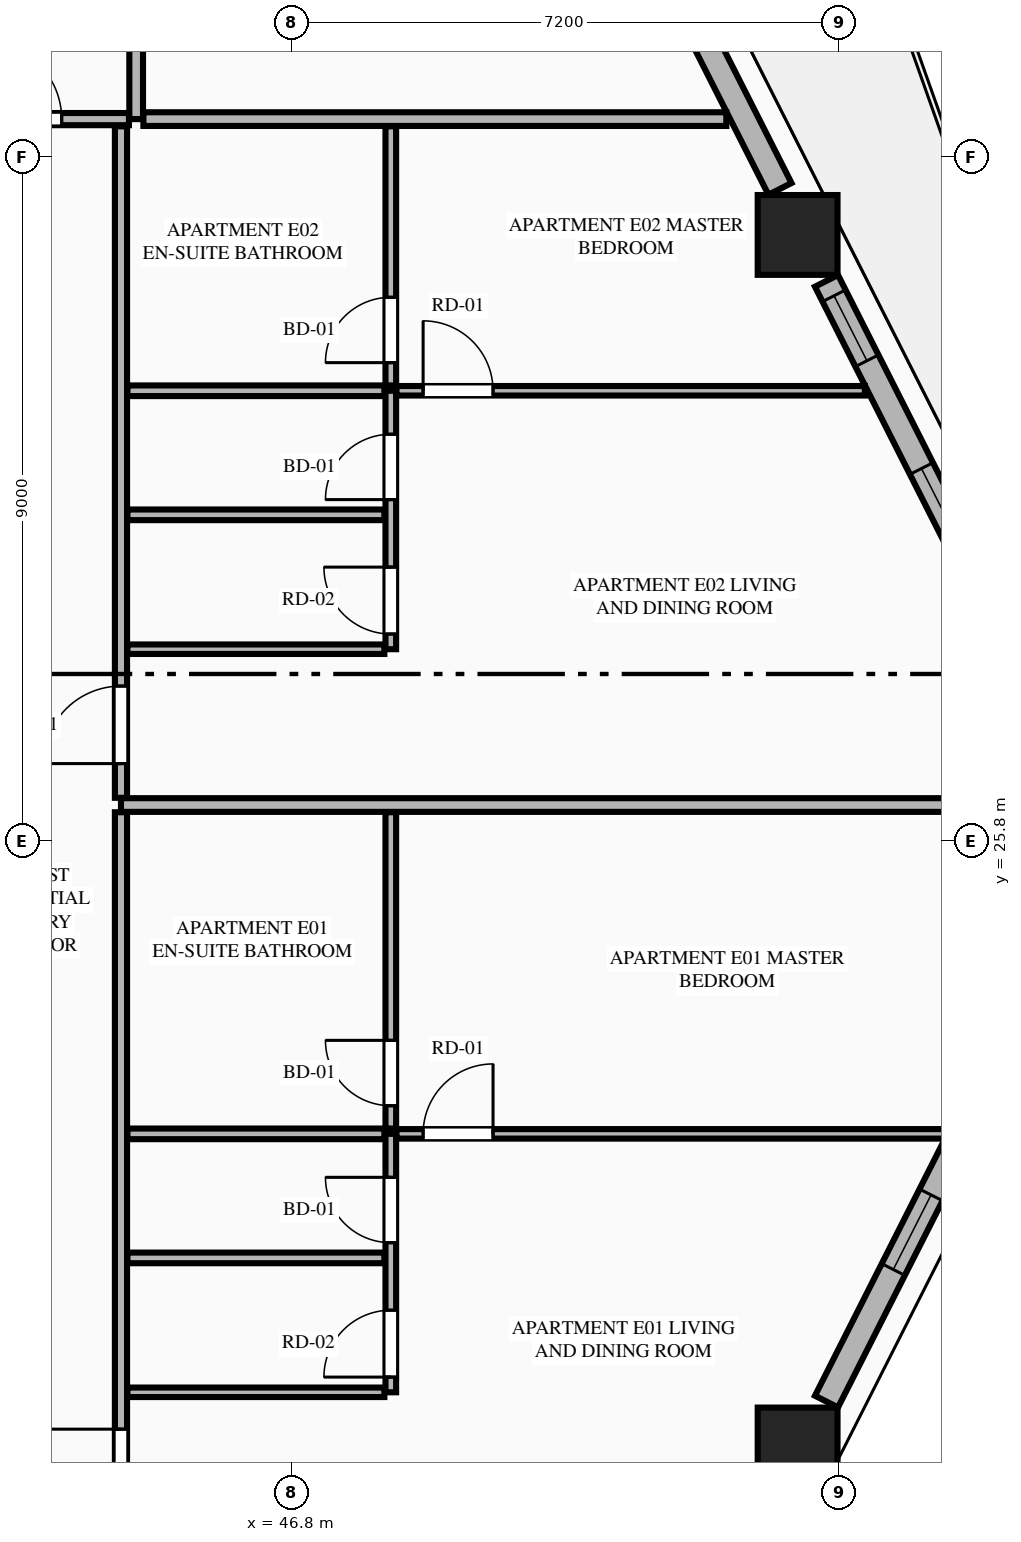
"""IFC4 building model, lengths in metres.
Left out: names, types, materials, properties, quantities, classifications, styles, units other than length and angle.
Written with IfcOpenShell. Run it as: python <this file> out.ifc"""

import sys

from ifc_helpers import new_model, si_unit, direction, frame, frame_2d, origin, origin_2d, place, context, subcontext, project, spatial, rectangle, extrude, element, fill, save


model = new_model("IFC4")
c1 = context("Model", 3, precision=1e-05, world=origin(), true_north=direction((0.0, 1.0)))
c2 = subcontext(c1, "Body", "Model", "MODEL_VIEW")
j1 = project(units=[si_unit("LENGTHUNIT", "METRE"), si_unit("PLANEANGLEUNIT", "RADIAN")], contexts=[c1])
p1 = place(None, origin())
s1 = spatial("IfcSite", under=j1, at=p1, CompositionType="ELEMENT")
p2 = place(p1, origin())
s2 = spatial("IfcBuilding", under=s1, at=p2, CompositionType="ELEMENT")
p3 = place(p2, frame((0.0, 0.0, 109.05)))
s3 = spatial("IfcBuildingStorey", under=s2, at=p3, CompositionType="ELEMENT", Elevation=109.05)
for number, where, z_axis, x_axis in (
    (1, (53.452, 17.824, 0.0), (0.0, 0.0, 1.0), (1.0, 0.0, 0.0)),
    (2, (53.452, 33.776, 0.0), (0.0, 0.0, 1.0), (1.0, 0.0, 0.0)),
):
    element("IfcColumn", number, at=place(p3, frame(where, z_axis=z_axis, x_axis=x_axis)), inside=s3, PredefinedType="COLUMN", context=c2, shape_type="SweptSolid", body=[
        extrude(rectangle(XDim=1.05, YDim=1.05, at=origin_2d()), origin(), (0.0, 0.0, 1.0), 3.55),
    ])
p4 = place(p3, frame((53.832, 18.428, 0.0), z_axis=(0.0, 0.0, 1.0), x_axis=(0.451431617681, 0.892305718102, 0.0)))
e3 = element("IfcWall", 3, at=p4, inside=s3, PredefinedType="STANDARD", context=c2, shape_type="SweptSolid", body=[
    extrude(rectangle(XDim=4.995, YDim=0.34, at=frame_2d((2.498, 0.0))), origin(), (0.0, 0.0, 1.0), 2.797),
])
p5 = place(p4, frame((1.947, 0.0, 0.75)))
e4 = element("IfcOpeningElement", 4, at=p5, cuts=e3, PredefinedType="OPENING", context=c2, shape_type="SweptSolid", body=[
    extrude(rectangle(XDim=1.1, YDim=1.897, at=frame_2d((0.55, 0.948))), frame((0.0, 0.18, 0.0), z_axis=(0.0, -1.0, 0.0), x_axis=(1.0, 0.0, 0.0)), (0.0, 0.0, 1.0), 0.36),
])
p6 = place(p3, frame((56.087, 28.715, 0.0), z_axis=(0.0, 0.0, 1.0), x_axis=(-0.451431617681, 0.892305718102, 0.0)))
e5 = element("IfcWall", 5, at=p6, inside=s3, PredefinedType="STANDARD", context=c2, shape_type="SweptSolid", body=[
    extrude(rectangle(XDim=4.995, YDim=0.34, at=frame_2d((2.498, 0.0))), origin(), (0.0, 0.0, 1.0), 2.797),
])
p7 = place(p6, frame((1.128, 0.0, 0.75)))
e6 = element("IfcOpeningElement", 6, at=p7, cuts=e5, PredefinedType="OPENING", context=c2, shape_type="SweptSolid", body=[
    extrude(rectangle(XDim=1.1, YDim=1.897, at=frame_2d((0.55, 0.948))), frame((0.0, 0.18, 0.0), z_axis=(0.0, -1.0, 0.0), x_axis=(1.0, 0.0, 0.0)), (0.0, 0.0, 1.0), 0.36),
])
p8 = place(p6, frame((3.817, 0.0, 0.75)))
e7 = element("IfcOpeningElement", 7, at=p8, cuts=e5, PredefinedType="OPENING", context=c2, shape_type="SweptSolid", body=[
    extrude(rectangle(XDim=0.958, YDim=1.897, at=frame_2d((0.479, 0.948))), frame((0.0, 0.18, 0.0), z_axis=(0.0, -1.0, 0.0), x_axis=(1.0, 0.0, 0.0)), (0.0, 0.0, 1.0), 0.36),
])
p9 = place(p3, frame((53.22, 34.382, 0.0), z_axis=(0.0, 0.0, 1.0), x_axis=(-0.451567731634, 0.892236842855, 0.0)))
e8 = element("IfcWall", 8, at=p9, inside=s3, PredefinedType="STANDARD", context=c2, shape_type="SweptSolid", body=[
    extrude(rectangle(XDim=5.219, YDim=0.34, at=frame_2d((2.61, 0.0))), origin(), (0.0, 0.0, 1.0), 2.797),
])
p10 = place(p9, frame((2.699, 0.0, 0.0)))
e9 = element("IfcOpeningElement", 9, at=p10, cuts=e8, PredefinedType="OPENING", context=c2, shape_type="SweptSolid", body=[
    extrude(rectangle(XDim=1.1, YDim=2.25, at=frame_2d((0.55, 1.125))), frame((0.0, 0.18, 0.0), z_axis=(0.0, -1.0, 0.0), x_axis=(1.0, 0.0, 0.0)), (0.0, 0.0, 1.0), 0.36),
])
p11 = place(p3, frame((44.75, 35.3, 0.0), z_axis=(0.0, 0.0, 1.0), x_axis=(0.0, 1.0, 0.0)))
e10 = element("IfcWall", 10, at=p11, inside=s3, PredefinedType="PARTITIONING", context=c2, shape_type="SweptSolid", body=[
    extrude(rectangle(XDim=12.195, YDim=0.18, at=frame_2d((6.098, 0.0))), origin(), (0.0, 0.0, 1.0), 3.34),
])
p12 = place(p3, frame((28.663, 35.3, 0.0), z_axis=(0.0, 0.0, 1.0), x_axis=(1.0, 0.0, 0.0)))
e11 = element("IfcWall", 11, at=p12, inside=s3, PredefinedType="PARTITIONING", context=c2, shape_type="SweptSolid", body=[
    extrude(rectangle(XDim=15.992, YDim=0.16, at=frame_2d((7.996, 0.0))), origin(), (0.0, 0.0, 1.0), 3.34),
])
p13 = place(p12, frame((14.087, 0.0, 0.0)))
e12 = element("IfcOpeningElement", 12, at=p13, cuts=e11, PredefinedType="OPENING", context=c2, shape_type="SweptSolid", body=[
    extrude(rectangle(XDim=1.02, YDim=2.25, at=frame_2d((0.51, 1.125))), frame((0.0, 0.09, 0.0), z_axis=(0.0, -1.0, 0.0), x_axis=(1.0, 0.0, 0.0)), (0.0, 0.0, 1.0), 0.18),
])
p14 = place(p3, frame((44.845, 35.3, 0.0), z_axis=(0.0, 0.0, 1.0), x_axis=(1.0, 0.0, 0.0)))
e13 = element("IfcWall", 13, at=p14, inside=s3, PredefinedType="PARTITIONING", context=c2, shape_type="SweptSolid", body=[
    extrude(rectangle(XDim=7.669, YDim=0.18, at=frame_2d((3.834, 0.0))), origin(), (0.0, 0.0, 1.0), 3.34),
])
p15 = place(p3, frame((44.55, 16.595, 0.0), z_axis=(0.0, 0.0, 1.0), x_axis=(0.0, 1.0, 0.0)))
e14 = element("IfcWall", 14, at=p15, inside=s3, PredefinedType="PARTITIONING", context=c2, shape_type="SweptSolid", body=[
    extrude(rectangle(XDim=9.586, YDim=0.16, at=frame_2d((4.793, 0.0))), origin(), (0.0, 0.0, 1.0), 3.34),
])
p16 = place(p15, frame((0.45, 0.0, 0.0)))
e15 = element("IfcOpeningElement", 15, at=p16, cuts=e14, PredefinedType="OPENING", context=c2, shape_type="SweptSolid", body=[
    extrude(rectangle(XDim=1.02, YDim=2.25, at=frame_2d((0.51, 1.125))), frame((0.0, 0.09, 0.0), z_axis=(0.0, -1.0, 0.0), x_axis=(1.0, 0.0, 0.0)), (0.0, 0.0, 1.0), 0.18),
])
p17 = place(p3, frame((44.635, 18.55, 0.0), z_axis=(0.0, 0.0, 1.0), x_axis=(1.0, 0.0, 0.0)))
e16 = element("IfcWall", 16, at=p17, inside=s3, PredefinedType="PARTITIONING", context=c2, shape_type="SweptSolid", body=[
    extrude(rectangle(XDim=3.38, YDim=0.125, at=frame_2d((1.69, 0.0))), origin(), (0.0, 0.0, 1.0), 2.722),
])
p18 = place(p3, frame((48.1, 18.55, 0.0), z_axis=(0.0, 0.0, 1.0), x_axis=(0.0, 1.0, 0.0)))
e17 = element("IfcWall", 17, at=p18, inside=s3, PredefinedType="PLUMBINGWALL", context=c2, shape_type="SweptSolid", body=[
    extrude(rectangle(XDim=3.4, YDim=0.14, at=frame_2d((1.7, 0.0))), origin(), (0.0, 0.0, 1.0), 3.34),
])
p19 = place(p18, frame((0.2, 0.0, 0.0)))
e18 = element("IfcOpeningElement", 18, at=p19, cuts=e17, PredefinedType="OPENING", context=c2, shape_type="SweptSolid", body=[
    extrude(rectangle(XDim=0.88, YDim=2.15, at=frame_2d((0.44, 1.075))), frame((0.0, 0.08, 0.0), z_axis=(0.0, -1.0, 0.0), x_axis=(1.0, 0.0, 0.0)), (0.0, 0.0, 1.0), 0.16),
])
p20 = place(p18, frame((1.968, 0.0, 0.0)))
e19 = element("IfcOpeningElement", 19, at=p20, cuts=e17, PredefinedType="OPENING", context=c2, shape_type="SweptSolid", body=[
    extrude(rectangle(XDim=0.86, YDim=2.1, at=frame_2d((0.43, 1.05))), frame((0.0, 0.08, 0.0), z_axis=(0.0, -1.0, 0.0), x_axis=(1.0, 0.0, 0.0)), (0.0, 0.0, 1.0), 0.16),
])
p21 = place(p3, frame((48.1, 22.02, 0.0), z_axis=(0.0, 0.0, 1.0), x_axis=(0.0, 1.0, 0.0)))
e20 = element("IfcWall", 20, at=p21, inside=s3, PredefinedType="PLUMBINGWALL", context=c2, shape_type="SweptSolid", body=[
    extrude(rectangle(XDim=4.161, YDim=0.14, at=frame_2d((2.081, 0.0))), origin(), (0.0, 0.0, 1.0), 3.34),
])
p22 = place(p21, frame((0.3, 0.0, 0.0)))
e21 = element("IfcOpeningElement", 21, at=p22, cuts=e20, PredefinedType="OPENING", context=c2, shape_type="SweptSolid", body=[
    extrude(rectangle(XDim=0.86, YDim=2.1, at=frame_2d((0.43, 1.05))), frame((0.0, 0.08, 0.0), z_axis=(0.0, -1.0, 0.0), x_axis=(1.0, 0.0, 0.0)), (0.0, 0.0, 1.0), 0.16),
])
p23 = place(p3, frame((44.635, 21.95, 0.0), z_axis=(0.0, 0.0, 1.0), x_axis=(1.0, 0.0, 0.0)))
e22 = element("IfcWall", 22, at=p23, inside=s3, PredefinedType="PLUMBINGWALL", context=c2, shape_type="SweptSolid", body=[
    extrude(rectangle(XDim=3.38, YDim=0.14, at=frame_2d((1.69, 0.0))), origin(), (0.0, 0.0, 1.0), 3.34),
])
p24 = place(p3, frame((48.175, 21.95, 0.0), z_axis=(0.0, 0.0, 1.0), x_axis=(1.0, 0.0, 0.0)))
e23 = element("IfcWall", 23, at=p24, inside=s3, PredefinedType="PARTITIONING", context=c2, shape_type="SweptSolid", body=[
    extrude(rectangle(XDim=7.213, YDim=0.125, at=frame_2d((3.606, 0.0))), origin(), (0.0, 0.0, 1.0), 3.34),
])
p25 = place(p24, frame((0.35, 0.0, 0.0)))
e24 = element("IfcOpeningElement", 24, at=p25, cuts=e23, PredefinedType="OPENING", context=c2, shape_type="SweptSolid", body=[
    extrude(rectangle(XDim=0.92, YDim=2.15, at=frame_2d((0.46, 1.075))), frame((0.0, 0.073, 0.0), z_axis=(0.0, -1.0, 0.0), x_axis=(1.0, 0.0, 0.0)), (0.0, 0.0, 1.0), 0.145),
])
p26 = place(p3, frame((44.635, 20.318, 0.0), z_axis=(0.0, 0.0, 1.0), x_axis=(1.0, 0.0, 0.0)))
e25 = element("IfcWall", 25, at=p26, inside=s3, PredefinedType="PLUMBINGWALL", context=c2, shape_type="SweptSolid", body=[
    extrude(rectangle(XDim=3.38, YDim=0.14, at=frame_2d((1.69, 0.0))), origin(), (0.0, 0.0, 1.0), 3.34),
])
p27 = place(p3, frame((44.55, 26.276, 0.0), z_axis=(0.0, 0.0, 1.0), x_axis=(1.0, 0.0, 0.0)))
e26 = element("IfcWall", 26, at=p27, inside=s3, PredefinedType="PARTITIONING", context=c2, shape_type="SweptSolid", body=[
    extrude(rectangle(XDim=12.308, YDim=0.18, at=frame_2d((6.154, 0.0))), origin(), (0.0, 0.0, 1.0), 3.34),
])
p28 = place(p3, frame((44.55, 26.371, 0.0), z_axis=(0.0, 0.0, 1.0), x_axis=(0.0, 1.0, 0.0)))
e27 = element("IfcWall", 27, at=p28, inside=s3, PredefinedType="PARTITIONING", context=c2, shape_type="SweptSolid", body=[
    extrude(rectangle(XDim=8.834, YDim=0.16, at=frame_2d((4.417, 0.0))), origin(), (0.0, 0.0, 1.0), 3.34),
])
p29 = place(p28, frame((0.45, 0.0, 0.0)))
e28 = element("IfcOpeningElement", 28, at=p29, cuts=e27, PredefinedType="OPENING", context=c2, shape_type="SweptSolid", body=[
    extrude(rectangle(XDim=1.02, YDim=2.25, at=frame_2d((0.51, 1.125))), frame((0.0, 0.09, 0.0), z_axis=(0.0, -1.0, 0.0), x_axis=(1.0, 0.0, 0.0)), (0.0, 0.0, 1.0), 0.18),
])
p30 = place(p3, frame((44.635, 28.326, 0.0), z_axis=(0.0, 0.0, 1.0), x_axis=(1.0, 0.0, 0.0)))
e29 = element("IfcWall", 29, at=p30, inside=s3, PredefinedType="PARTITIONING", context=c2, shape_type="SweptSolid", body=[
    extrude(rectangle(XDim=3.38, YDim=0.125, at=frame_2d((1.69, 0.0))), origin(), (0.0, 0.0, 1.0), 3.34),
])
p31 = place(p3, frame((48.1, 28.326, 0.0), z_axis=(0.0, 0.0, 1.0), x_axis=(0.0, 1.0, 0.0)))
e30 = element("IfcWall", 30, at=p31, inside=s3, PredefinedType="PLUMBINGWALL", context=c2, shape_type="SweptSolid", body=[
    extrude(rectangle(XDim=3.4, YDim=0.14, at=frame_2d((1.7, 0.0))), origin(), (0.0, 0.0, 1.0), 3.34),
])
p32 = place(p31, frame((0.2, 0.0, 0.0)))
e31 = element("IfcOpeningElement", 31, at=p32, cuts=e30, PredefinedType="OPENING", context=c2, shape_type="SweptSolid", body=[
    extrude(rectangle(XDim=0.88, YDim=2.15, at=frame_2d((0.44, 1.075))), frame((0.0, 0.08, 0.0), z_axis=(0.0, -1.0, 0.0), x_axis=(1.0, 0.0, 0.0)), (0.0, 0.0, 1.0), 0.16),
])
p33 = place(p31, frame((1.968, 0.0, 0.0)))
e32 = element("IfcOpeningElement", 32, at=p33, cuts=e30, PredefinedType="OPENING", context=c2, shape_type="SweptSolid", body=[
    extrude(rectangle(XDim=0.86, YDim=2.1, at=frame_2d((0.43, 1.05))), frame((0.0, 0.08, 0.0), z_axis=(0.0, -1.0, 0.0), x_axis=(1.0, 0.0, 0.0)), (0.0, 0.0, 1.0), 0.16),
])
p34 = place(p3, frame((48.1, 31.796, 0.0), z_axis=(0.0, 0.0, 1.0), x_axis=(0.0, 1.0, 0.0)))
e33 = element("IfcWall", 33, at=p34, inside=s3, PredefinedType="PLUMBINGWALL", context=c2, shape_type="SweptSolid", body=[
    extrude(rectangle(XDim=3.409, YDim=0.14, at=frame_2d((1.705, 0.0))), origin(), (0.0, 0.0, 1.0), 3.34),
])
p35 = place(p34, frame((0.3, 0.0, 0.0)))
e34 = element("IfcOpeningElement", 34, at=p35, cuts=e33, PredefinedType="OPENING", context=c2, shape_type="SweptSolid", body=[
    extrude(rectangle(XDim=0.86, YDim=2.1, at=frame_2d((0.43, 1.05))), frame((0.0, 0.08, 0.0), z_axis=(0.0, -1.0, 0.0), x_axis=(1.0, 0.0, 0.0)), (0.0, 0.0, 1.0), 0.16),
])
p36 = place(p3, frame((44.635, 31.726, 0.0), z_axis=(0.0, 0.0, 1.0), x_axis=(1.0, 0.0, 0.0)))
e35 = element("IfcWall", 35, at=p36, inside=s3, PredefinedType="PLUMBINGWALL", context=c2, shape_type="SweptSolid", body=[
    extrude(rectangle(XDim=3.38, YDim=0.14, at=frame_2d((1.69, 0.0))), origin(), (0.0, 0.0, 1.0), 3.34),
])
p37 = place(p3, frame((48.175, 31.726, 0.0), z_axis=(0.0, 0.0, 1.0), x_axis=(1.0, 0.0, 0.0)))
e36 = element("IfcWall", 36, at=p37, inside=s3, PredefinedType="PARTITIONING", context=c2, shape_type="SweptSolid", body=[
    extrude(rectangle(XDim=6.162, YDim=0.125, at=frame_2d((3.081, 0.0))), origin(), (0.0, 0.0, 1.0), 3.34),
])
p38 = place(p37, frame((0.35, 0.0, 0.0)))
e37 = element("IfcOpeningElement", 37, at=p38, cuts=e36, PredefinedType="OPENING", context=c2, shape_type="SweptSolid", body=[
    extrude(rectangle(XDim=0.92, YDim=2.15, at=frame_2d((0.46, 1.075))), frame((0.0, 0.073, 0.0), z_axis=(0.0, -1.0, 0.0), x_axis=(1.0, 0.0, 0.0)), (0.0, 0.0, 1.0), 0.145),
])
p39 = place(p3, frame((44.635, 30.094, 0.0), z_axis=(0.0, 0.0, 1.0), x_axis=(1.0, 0.0, 0.0)))
e38 = element("IfcWall", 38, at=p39, inside=s3, PredefinedType="PLUMBINGWALL", context=c2, shape_type="SweptSolid", body=[
    extrude(rectangle(XDim=3.38, YDim=0.14, at=frame_2d((1.69, 0.0))), origin(), (0.0, 0.0, 1.0), 3.34),
])
p40 = place(p5, origin())
e39 = element("IfcWindow", 39, at=p40, inside=s3, PartitioningType="SINGLE_PANEL", PredefinedType="WINDOW", context=c2, shape_type="SweptSolid", body=[
    extrude(rectangle(XDim=1.1, YDim=1.897, at=frame_2d((0.55, 0.948))), frame((0.0, 0.03, 0.0), z_axis=(0.0, -1.0, 0.0), x_axis=(1.0, 0.0, 0.0)), (0.0, 0.0, 1.0), 0.06),
])
fill(e4, e39)
p41 = place(p7, origin())
e40 = element("IfcWindow", 40, at=p41, inside=s3, PartitioningType="SINGLE_PANEL", PredefinedType="WINDOW", context=c2, shape_type="SweptSolid", body=[
    extrude(rectangle(XDim=1.1, YDim=1.897, at=frame_2d((0.55, 0.948))), frame((0.0, 0.03, 0.0), z_axis=(0.0, -1.0, 0.0), x_axis=(1.0, 0.0, 0.0)), (0.0, 0.0, 1.0), 0.06),
])
fill(e6, e40)
p42 = place(p13, origin())
e41 = element("IfcDoor", 41, at=p42, inside=s3, OperationType="SINGLE_SWING_LEFT", PredefinedType="DOOR", context=c2, shape_type="SweptSolid", body=[
    extrude(rectangle(XDim=1.02, YDim=2.25, at=frame_2d((0.51, 1.125))), frame((0.0, 0.025, 0.0), z_axis=(0.0, -1.0, 0.0), x_axis=(1.0, 0.0, 0.0)), (0.0, 0.0, 1.0), 0.05),
])
fill(e12, e41)
p43 = place(p19, origin())
e42 = element("IfcDoor", 42, at=p43, inside=s3, OperationType="SINGLE_SWING_LEFT", PredefinedType="DOOR", context=c2, shape_type="SweptSolid", body=[
    extrude(rectangle(XDim=0.88, YDim=2.15, at=frame_2d((0.44, 1.075))), frame((0.0, 0.025, 0.0), z_axis=(0.0, -1.0, 0.0), x_axis=(1.0, 0.0, 0.0)), (0.0, 0.0, 1.0), 0.05),
])
fill(e18, e42)
p44 = place(p20, origin())
e43 = element("IfcDoor", 43, at=p44, inside=s3, OperationType="SINGLE_SWING_RIGHT", PredefinedType="DOOR", context=c2, shape_type="SweptSolid", body=[
    extrude(rectangle(XDim=0.86, YDim=2.1, at=frame_2d((0.43, 1.05))), frame((0.0, 0.025, 0.0), z_axis=(0.0, -1.0, 0.0), x_axis=(1.0, 0.0, 0.0)), (0.0, 0.0, 1.0), 0.05),
])
fill(e19, e43)
p45 = place(p22, origin())
e44 = element("IfcDoor", 44, at=p45, inside=s3, OperationType="SINGLE_SWING_RIGHT", PredefinedType="DOOR", context=c2, shape_type="SweptSolid", body=[
    extrude(rectangle(XDim=0.86, YDim=2.1, at=frame_2d((0.43, 1.05))), frame((0.0, 0.025, 0.0), z_axis=(0.0, -1.0, 0.0), x_axis=(1.0, 0.0, 0.0)), (0.0, 0.0, 1.0), 0.05),
])
fill(e21, e44)
p46 = place(p16, origin())
e45 = element("IfcDoor", 45, at=p46, inside=s3, OperationType="SINGLE_SWING_RIGHT", PredefinedType="DOOR", context=c2, shape_type="SweptSolid", body=[
    extrude(rectangle(XDim=1.02, YDim=2.25, at=frame_2d((0.51, 1.125))), frame((0.0, 0.025, 0.0), z_axis=(0.0, -1.0, 0.0), x_axis=(1.0, 0.0, 0.0)), (0.0, 0.0, 1.0), 0.05),
])
fill(e15, e45)
p47 = place(p25, origin())
e46 = element("IfcDoor", 46, at=p47, inside=s3, OperationType="SINGLE_SWING_RIGHT", PredefinedType="DOOR", context=c2, shape_type="SweptSolid", body=[
    extrude(rectangle(XDim=0.92, YDim=2.15, at=frame_2d((0.46, 1.075))), frame((0.0, 0.025, 0.0), z_axis=(0.0, -1.0, 0.0), x_axis=(1.0, 0.0, 0.0)), (0.0, 0.0, 1.0), 0.05),
])
fill(e24, e46)
p48 = place(p32, origin())
e47 = element("IfcDoor", 47, at=p48, inside=s3, OperationType="SINGLE_SWING_RIGHT", PredefinedType="DOOR", context=c2, shape_type="SweptSolid", body=[
    extrude(rectangle(XDim=0.88, YDim=2.15, at=frame_2d((0.44, 1.075))), frame((0.0, 0.025, 0.0), z_axis=(0.0, -1.0, 0.0), x_axis=(1.0, 0.0, 0.0)), (0.0, 0.0, 1.0), 0.05),
])
fill(e31, e47)
p49 = place(p33, origin())
e48 = element("IfcDoor", 48, at=p49, inside=s3, OperationType="SINGLE_SWING_LEFT", PredefinedType="DOOR", context=c2, shape_type="SweptSolid", body=[
    extrude(rectangle(XDim=0.86, YDim=2.1, at=frame_2d((0.43, 1.05))), frame((0.0, 0.025, 0.0), z_axis=(0.0, -1.0, 0.0), x_axis=(1.0, 0.0, 0.0)), (0.0, 0.0, 1.0), 0.05),
])
fill(e32, e48)
p50 = place(p35, origin())
e49 = element("IfcDoor", 49, at=p50, inside=s3, OperationType="SINGLE_SWING_LEFT", PredefinedType="DOOR", context=c2, shape_type="SweptSolid", body=[
    extrude(rectangle(XDim=0.86, YDim=2.1, at=frame_2d((0.43, 1.05))), frame((0.0, 0.025, 0.0), z_axis=(0.0, -1.0, 0.0), x_axis=(1.0, 0.0, 0.0)), (0.0, 0.0, 1.0), 0.05),
])
fill(e34, e49)
p51 = place(p29, origin())
e50 = element("IfcDoor", 50, at=p51, inside=s3, OperationType="SINGLE_SWING_LEFT", PredefinedType="DOOR", context=c2, shape_type="SweptSolid", body=[
    extrude(rectangle(XDim=1.02, YDim=2.25, at=frame_2d((0.51, 1.125))), frame((0.0, 0.025, 0.0), z_axis=(0.0, -1.0, 0.0), x_axis=(1.0, 0.0, 0.0)), (0.0, 0.0, 1.0), 0.05),
])
fill(e28, e50)
p52 = place(p38, origin())
e51 = element("IfcDoor", 51, at=p52, inside=s3, OperationType="SINGLE_SWING_LEFT", PredefinedType="DOOR", context=c2, shape_type="SweptSolid", body=[
    extrude(rectangle(XDim=0.92, YDim=2.15, at=frame_2d((0.46, 1.075))), frame((0.0, 0.025, 0.0), z_axis=(0.0, -1.0, 0.0), x_axis=(1.0, 0.0, 0.0)), (0.0, 0.0, 1.0), 0.05),
])
fill(e37, e51)
p53 = place(p8, origin())
e52 = element("IfcWindow", 52, at=p53, inside=s3, PartitioningType="SINGLE_PANEL", PredefinedType="WINDOW", context=c2, shape_type="SweptSolid", body=[
    extrude(rectangle(XDim=0.958, YDim=1.897, at=frame_2d((0.479, 0.948))), frame((0.0, 0.03, 0.0), z_axis=(0.0, -1.0, 0.0), x_axis=(1.0, 0.0, 0.0)), (0.0, 0.0, 1.0), 0.06),
])
fill(e7, e52)
save(model, sys.argv[1])
